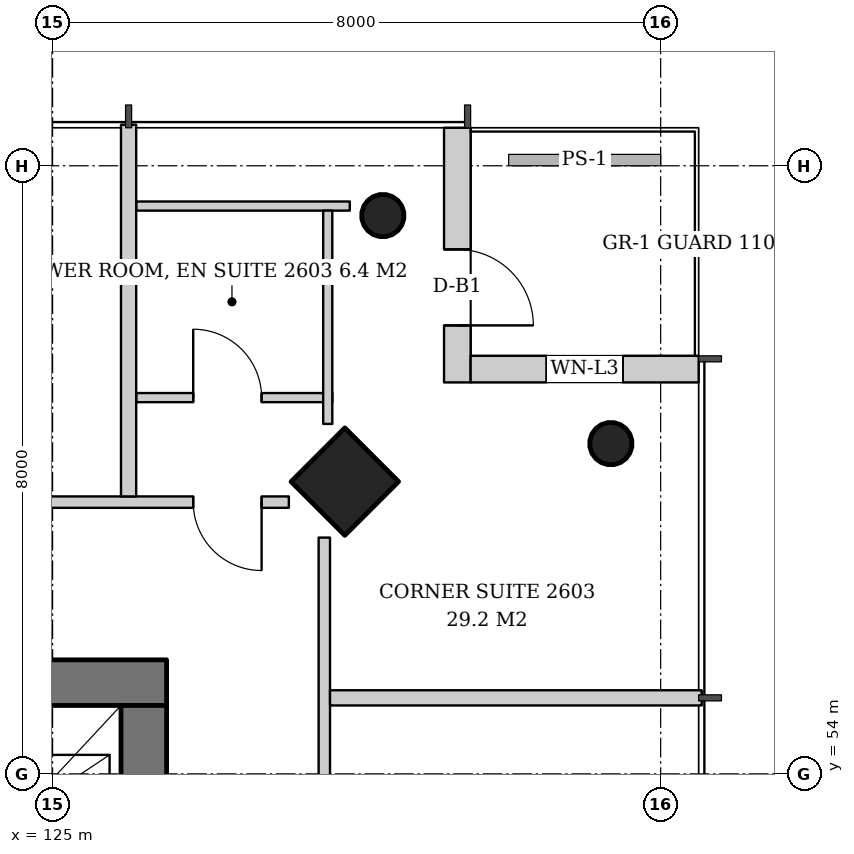
"""IFC4 building model, lengths in metres.
Left out: names, types, materials, properties, quantities, classifications, styles, units other than length and angle.
Written with IfcOpenShell. Run it as: python <this file> out.ifc"""

import sys

from ifc_helpers import new_model, si_unit, direction, frame, frame_2d, origin, origin_2d, place, context, subcontext, project, spatial, rectangle, hollow_circle, extrude, element, fill, save


model = new_model("IFC4")
c1 = context("Model", 3, precision=1e-05, world=origin(), true_north=direction((0.0, 1.0)))
c2 = subcontext(c1, "Body", "Model", "MODEL_VIEW")
j1 = project(units=[si_unit("LENGTHUNIT", "METRE"), si_unit("PLANEANGLEUNIT", "RADIAN")], contexts=[c1])
p1 = place(None, origin())
s1 = spatial("IfcSite", under=j1, at=p1, CompositionType="ELEMENT")
p2 = place(p1, origin())
s2 = spatial("IfcBuilding", under=s1, at=p2, CompositionType="ELEMENT")
p3 = place(p2, frame((0.0, 0.0, 104.6)))
s3 = spatial("IfcBuildingStorey", under=s2, at=p3, CompositionType="ELEMENT", Elevation=104.6)
p4 = place(p3, frame((128.896, 57.896, 0.0), z_axis=(-0.043032401563, -0.043032401563, 0.998146494675), x_axis=(0.707106781187, -0.707106781187, 0.0)))
e1 = element("IfcColumn", 1, at=p4, inside=s3, PredefinedType="COLUMN", context=c2, shape_type="SweptSolid", body=[
    extrude(rectangle(XDim=1.0, YDim=1.0, at=origin_2d()), origin(), (0.0, 0.0, 1.0), 3.807),
])
for number, where, z_axis, x_axis in (
    (2, (132.396, 58.396, 0.0), (-0.043, -0.043, 0.998), (0.707, -0.707, 0.0)),
    (3, (129.396, 61.396, 0.0), (-0.043, -0.043, 0.998), (0.707, -0.707, 0.0)),
):
    element("IfcColumn", number, at=place(p3, frame(where, z_axis=z_axis, x_axis=x_axis)), inside=s3, PredefinedType="COLUMN", context=c2, shape_type="SweptSolid", body=[
        extrude(hollow_circle(Radius=0.28, WallThickness=0.02, at=origin_2d()), origin(), (0.0, 0.0, 1.0), 3.807),
    ])
p5 = place(p3, frame((107.5, 55.2, 0.0), z_axis=(0.0, 0.0, 1.0), x_axis=(1.0, 0.0, 0.0)))
e4 = element("IfcWall", 4, at=p5, inside=s3, PredefinedType="SHEAR", context=c2, shape_type="SweptSolid", body=[
    extrude(rectangle(XDim=19.0, YDim=0.6, at=frame_2d((9.5, 0.0))), origin(), (0.0, 0.0, 1.0), 3.8),
])
p6 = place(p5, frame((14.14, 0.0, 0.0)))
e5 = element("IfcOpeningElement", 5, at=p6, cuts=e4, PredefinedType="OPENING", context=c2, shape_type="SweptSolid", body=[
    extrude(rectangle(XDim=1.0, YDim=2.1, at=frame_2d((0.5, 1.05))), frame((0.0, 0.31, 0.0), z_axis=(0.0, -1.0, 0.0), x_axis=(1.0, 0.0, 0.0)), (0.0, 0.0, 1.0), 0.62),
])
p7 = place(p5, frame((2.425, 0.0, 0.0)))
e6 = element("IfcOpeningElement", 6, at=p7, cuts=e4, PredefinedType="OPENING", context=c2, shape_type="SweptSolid", body=[
    extrude(rectangle(XDim=1.0, YDim=2.1, at=frame_2d((0.5, 1.05))), frame((0.0, 0.31, 0.0), z_axis=(0.0, -1.0, 0.0), x_axis=(1.0, 0.0, 0.0)), (0.0, 0.0, 1.0), 0.62),
])
p8 = place(p3, frame((126.2, 37.1, 0.0), z_axis=(0.0, 0.0, 1.0), x_axis=(0.0, 1.0, 0.0)))
e7 = element("IfcWall", 7, at=p8, inside=s3, PredefinedType="SHEAR", context=c2, shape_type="SweptSolid", body=[
    extrude(rectangle(XDim=17.8, YDim=0.6, at=frame_2d((8.9, 0.0))), origin(), (0.0, 0.0, 1.0), 3.8),
])
p9 = place(p8, frame((8.0, 0.0, 0.0)))
e8 = element("IfcOpeningElement", 8, at=p9, cuts=e7, PredefinedType="OPENING", context=c2, shape_type="SweptSolid", body=[
    extrude(rectangle(XDim=1.8, YDim=2.4, at=frame_2d((0.9, 1.2))), frame((0.0, 0.31, 0.0), z_axis=(0.0, -1.0, 0.0), x_axis=(1.0, 0.0, 0.0)), (0.0, 0.0, 1.0), 0.62),
])
p10 = place(p3, frame((130.325, 62.5, 0.0), z_axis=(0.0, 0.0, 1.0), x_axis=(0.0, -1.0, 0.0)))
e9 = element("IfcWall", 9, at=p10, inside=s3, PredefinedType="SOLIDWALL", context=c2, shape_type="SweptSolid", body=[
    extrude(rectangle(XDim=3.35, YDim=0.35, at=frame_2d((1.675, 0.0))), origin(), (0.0, 0.0, 1.0), 3.6),
])
p11 = place(p10, frame((1.6, 0.0, 0.0)))
e10 = element("IfcOpeningElement", 10, at=p11, cuts=e9, PredefinedType="OPENING", context=c2, shape_type="SweptSolid", body=[
    extrude(rectangle(XDim=1.0, YDim=2.4, at=frame_2d((0.5, 1.2))), frame((0.0, 0.185, 0.0), z_axis=(0.0, -1.0, 0.0), x_axis=(1.0, 0.0, 0.0)), (0.0, 0.0, 1.0), 0.37),
])
p12 = place(p3, frame((130.5, 59.325, 0.0), z_axis=(0.0, 0.0, 1.0), x_axis=(1.0, 0.0, 0.0)))
e11 = element("IfcWall", 11, at=p12, inside=s3, PredefinedType="SOLIDWALL", context=c2, shape_type="SweptSolid", body=[
    extrude(rectangle(XDim=3.0, YDim=0.35, at=frame_2d((1.5, 0.0))), origin(), (0.0, 0.0, 1.0), 3.6),
])
p13 = place(p12, frame((1.0, 0.0, 0.9)))
e12 = element("IfcOpeningElement", 12, at=p13, cuts=e11, PredefinedType="OPENING", context=c2, shape_type="SweptSolid", body=[
    extrude(rectangle(XDim=1.0, YDim=2.4, at=frame_2d((0.5, 1.2))), frame((0.0, 0.185, 0.0), z_axis=(0.0, -1.0, 0.0), x_axis=(1.0, 0.0, 0.0)), (0.0, 0.0, 1.0), 0.37),
])
p14 = place(p3, frame((128.575, 34.892, 0.0), z_axis=(0.0, 0.0, 1.0), x_axis=(0.0, 1.0, 0.0)))
e13 = element("IfcWall", 13, at=p14, inside=s3, PredefinedType="PARTITIONING", context=c2, shape_type="SweptSolid", body=[
    extrude(rectangle(XDim=22.217, YDim=0.15, at=frame_2d((11.108, 0.0))), origin(), (0.0, 0.0, 1.0), 2.9),
])
p15 = place(p14, frame((0.358, 0.0, 0.0)))
e14 = element("IfcOpeningElement", 14, at=p15, cuts=e13, PredefinedType="OPENING", context=c2, shape_type="SweptSolid", body=[
    extrude(rectangle(XDim=0.9, YDim=2.1, at=frame_2d((0.45, 1.05))), frame((0.0, 0.085, 0.0), z_axis=(0.0, -1.0, 0.0), x_axis=(1.0, 0.0, 0.0)), (0.0, 0.0, 1.0), 0.17),
])
p16 = place(p14, frame((4.808, 0.0, 0.0)))
e15 = element("IfcOpeningElement", 15, at=p16, cuts=e13, PredefinedType="OPENING", context=c2, shape_type="SweptSolid", body=[
    extrude(rectangle(XDim=1.0, YDim=2.1, at=frame_2d((0.5, 1.05))), frame((0.0, 0.085, 0.0), z_axis=(0.0, -1.0, 0.0), x_axis=(1.0, 0.0, 0.0)), (0.0, 0.0, 1.0), 0.17),
])
p17 = place(p14, frame((13.858, 0.0, 0.0)))
e16 = element("IfcOpeningElement", 16, at=p17, cuts=e13, PredefinedType="OPENING", context=c2, shape_type="SweptSolid", body=[
    extrude(rectangle(XDim=0.9, YDim=2.1, at=frame_2d((0.45, 1.05))), frame((0.0, 0.085, 0.0), z_axis=(0.0, -1.0, 0.0), x_axis=(1.0, 0.0, 0.0)), (0.0, 0.0, 1.0), 0.17),
])
p18 = place(p3, frame((128.65, 55.0, 0.0), z_axis=(0.0, 0.0, 1.0), x_axis=(1.0, 0.0, 0.0)))
e17 = element("IfcWall", 17, at=p18, inside=s3, PredefinedType="PARTITIONING", context=c2, shape_type="SweptSolid", body=[
    extrude(rectangle(XDim=4.89, YDim=0.2, at=frame_2d((2.445, 0.0))), origin(), (0.0, 0.0, 1.0), 3.2),
])
p19 = place(p3, frame((126.1, 58.95, 0.0), z_axis=(0.0, 0.0, 1.0), x_axis=(1.0, 0.0, 0.0)))
e18 = element("IfcWall", 18, at=p19, inside=s3, PredefinedType="PARTITIONING", context=c2, shape_type="SweptSolid", body=[
    extrude(rectangle(XDim=2.58, YDim=0.12, at=frame_2d((1.29, 0.0))), origin(), (0.0, 0.0, 1.0), 2.9),
])
p20 = place(p19, frame((0.75, 0.0, 0.0)))
e19 = element("IfcOpeningElement", 19, at=p20, cuts=e18, PredefinedType="OPENING", context=c2, shape_type="SweptSolid", body=[
    extrude(rectangle(XDim=0.9, YDim=2.1, at=frame_2d((0.45, 1.05))), frame((0.0, 0.07, 0.0), z_axis=(0.0, -1.0, 0.0), x_axis=(1.0, 0.0, 0.0)), (0.0, 0.0, 1.0), 0.14),
])
p21 = place(p3, frame((126.1, 61.47, 0.0), z_axis=(0.0, 0.0, 1.0), x_axis=(1.0, 0.0, 0.0)))
e20 = element("IfcWall", 20, at=p21, inside=s3, PredefinedType="PARTITIONING", context=c2, shape_type="SweptSolid", body=[
    extrude(rectangle(XDim=2.81, YDim=0.12, at=frame_2d((1.405, 0.0))), origin(), (0.0, 0.0, 1.0), 3.6),
])
p22 = place(p3, frame((128.62, 58.604, 0.0), z_axis=(0.0, 0.0, 1.0), x_axis=(0.0, 1.0, 0.0)))
e21 = element("IfcWall", 21, at=p22, inside=s3, PredefinedType="PARTITIONING", context=c2, shape_type="SweptSolid", body=[
    extrude(rectangle(XDim=2.806, YDim=0.12, at=frame_2d((1.403, 0.0))), origin(), (0.0, 0.0, 1.0), 3.2),
])
p23 = place(p3, frame((128.108, 57.575, 0.0), z_axis=(0.0, 0.0, 1.0), x_axis=(-1.0, 0.0, 0.0)))
e22 = element("IfcWall", 22, at=p23, inside=s3, PredefinedType="PARTITIONING", context=c2, shape_type="SweptSolid", body=[
    extrude(rectangle(XDim=22.217, YDim=0.15, at=frame_2d((11.108, 0.0))), origin(), (0.0, 0.0, 1.0), 2.9),
])
p24 = place(p23, frame((0.358, 0.0, 0.0)))
e23 = element("IfcOpeningElement", 23, at=p24, cuts=e22, PredefinedType="OPENING", context=c2, shape_type="SweptSolid", body=[
    extrude(rectangle(XDim=0.9, YDim=2.1, at=frame_2d((0.45, 1.05))), frame((0.0, 0.085, 0.0), z_axis=(0.0, -1.0, 0.0), x_axis=(1.0, 0.0, 0.0)), (0.0, 0.0, 1.0), 0.17),
])
p25 = place(p23, frame((4.808, 0.0, 0.0)))
e24 = element("IfcOpeningElement", 24, at=p25, cuts=e22, PredefinedType="OPENING", context=c2, shape_type="SweptSolid", body=[
    extrude(rectangle(XDim=1.0, YDim=2.1, at=frame_2d((0.5, 1.05))), frame((0.0, 0.085, 0.0), z_axis=(0.0, -1.0, 0.0), x_axis=(1.0, 0.0, 0.0)), (0.0, 0.0, 1.0), 0.17),
])
p26 = place(p23, frame((13.858, 0.0, 0.0)))
e25 = element("IfcOpeningElement", 25, at=p26, cuts=e22, PredefinedType="OPENING", context=c2, shape_type="SweptSolid", body=[
    extrude(rectangle(XDim=0.9, YDim=2.1, at=frame_2d((0.45, 1.05))), frame((0.0, 0.085, 0.0), z_axis=(0.0, -1.0, 0.0), x_axis=(1.0, 0.0, 0.0)), (0.0, 0.0, 1.0), 0.17),
])
p27 = place(p3, frame((126.0, 57.65, 0.0), z_axis=(0.0, 0.0, 1.0), x_axis=(0.0, 1.0, 0.0)))
e26 = element("IfcWall", 26, at=p27, inside=s3, PredefinedType="PARTITIONING", context=c2, shape_type="SweptSolid", body=[
    extrude(rectangle(XDim=4.89, YDim=0.2, at=frame_2d((2.445, 0.0))), origin(), (0.0, 0.0, 1.0), 2.9),
])
p28 = place(p11, origin())
e27 = element("IfcDoor", 27, at=p28, inside=s3, OperationType="SINGLE_SWING_RIGHT", PredefinedType="DOOR", context=c2, shape_type="SweptSolid", body=[
    extrude(rectangle(XDim=1.0, YDim=2.4, at=frame_2d((0.5, 1.2))), frame((0.0, 0.025, 0.0), z_axis=(0.0, -1.0, 0.0), x_axis=(1.0, 0.0, 0.0)), (0.0, 0.0, 1.0), 0.05),
])
fill(e10, e27)
p29 = place(p13, origin())
e28 = element("IfcWindow", 28, at=p29, inside=s3, PartitioningType="SINGLE_PANEL", PredefinedType="WINDOW", context=c2, shape_type="SweptSolid", body=[
    extrude(rectangle(XDim=1.0, YDim=2.4, at=frame_2d((0.5, 1.2))), frame((0.0, 0.03, 0.0), z_axis=(0.0, -1.0, 0.0), x_axis=(1.0, 0.0, 0.0)), (0.0, 0.0, 1.0), 0.06),
])
fill(e12, e28)
p30 = place(p20, origin())
e29 = element("IfcDoor", 29, at=p30, inside=s3, OperationType="SINGLE_SWING_LEFT", PredefinedType="DOOR", context=c2, shape_type="SweptSolid", body=[
    extrude(rectangle(XDim=0.9, YDim=2.1, at=frame_2d((0.45, 1.05))), frame((0.0, 0.025, 0.0), z_axis=(0.0, -1.0, 0.0), x_axis=(1.0, 0.0, 0.0)), (0.0, 0.0, 1.0), 0.05),
])
fill(e19, e29)
p31 = place(p24, origin())
e30 = element("IfcDoor", 30, at=p31, inside=s3, OperationType="SINGLE_SWING_LEFT", PredefinedType="DOOR", context=c2, shape_type="SweptSolid", body=[
    extrude(rectangle(XDim=0.9, YDim=2.1, at=frame_2d((0.45, 1.05))), frame((0.0, 0.025, 0.0), z_axis=(0.0, -1.0, 0.0), x_axis=(1.0, 0.0, 0.0)), (0.0, 0.0, 1.0), 0.05),
])
fill(e23, e30)
save(model, sys.argv[1])
